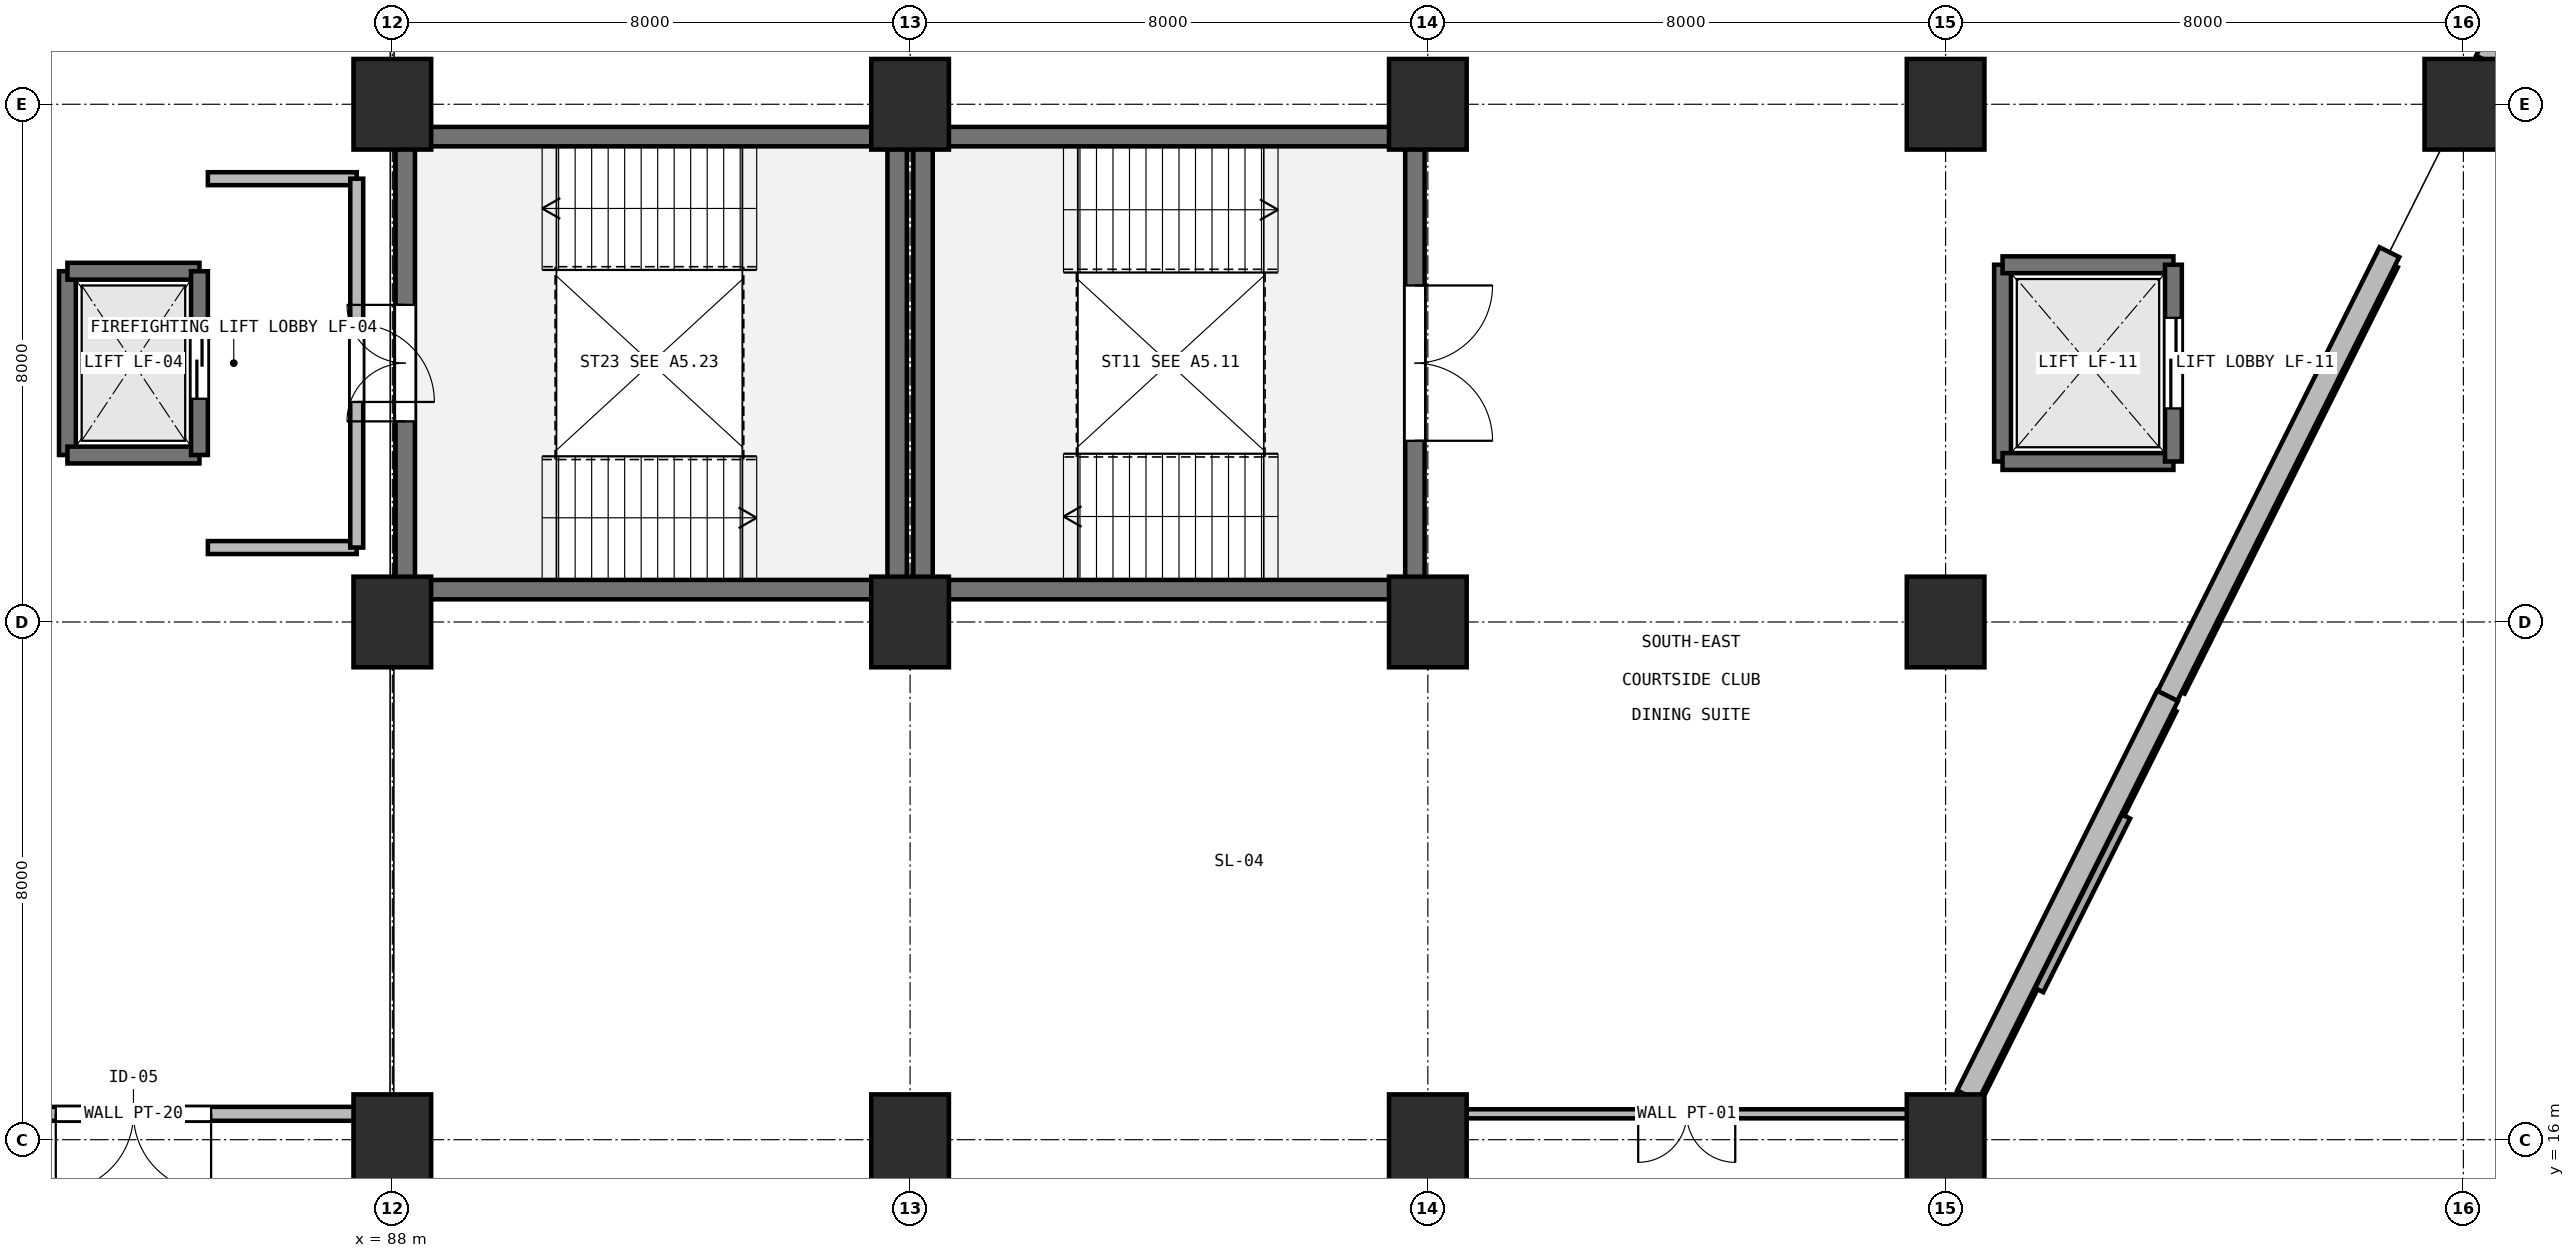
"""IFC4 building model, lengths in metres.
Left out: names, types, materials, properties, quantities, classifications, styles, units other than length and angle.
Written with IfcOpenShell. Run it as: python <this file> out.ifc"""

import sys

from ifc_helpers import new_model, si_unit, direction, frame, frame_2d, origin, origin_2d, place, context, subcontext, project, spatial, rectangle, extrude, element, fill, save


model = new_model("IFC4")
c1 = context("Model", 3, precision=1e-05, world=origin(), true_north=direction((0.0, 1.0)))
c2 = subcontext(c1, "Body", "Model", "MODEL_VIEW")
j1 = project(units=[si_unit("LENGTHUNIT", "METRE"), si_unit("PLANEANGLEUNIT", "RADIAN")], contexts=[c1])
p1 = place(None, origin())
s1 = spatial("IfcSite", under=j1, at=p1, CompositionType="ELEMENT")
p2 = place(p1, origin())
s2 = spatial("IfcBuilding", under=s1, at=p2, CompositionType="ELEMENT")
p3 = place(p2, frame((0.0, 0.0, 5.4)))
s3 = spatial("IfcBuildingStorey", under=s2, at=p3, CompositionType="ELEMENT", Elevation=5.4)
for number, where, z_axis, x_axis in (
    (1, (88.0, 16.0, 0.0), (0.0, 0.0, 1.0), (1.0, 0.0, 0.0)),
    (2, (88.0, 24.0, 0.0), (0.0, 0.0, 1.0), (1.0, 0.0, 0.0)),
    (3, (88.0, 32.0, 0.0), (0.0, 0.0, 1.0), (1.0, 0.0, 0.0)),
    (4, (96.0, 16.0, 0.0), (0.0, 0.0, 1.0), (1.0, 0.0, 0.0)),
    (5, (96.0, 24.0, 0.0), (0.0, 0.0, 1.0), (1.0, 0.0, 0.0)),
    (6, (96.0, 32.0, 0.0), (0.0, 0.0, 1.0), (1.0, 0.0, 0.0)),
    (7, (104.0, 16.0, 0.0), (0.0, 0.0, 1.0), (1.0, 0.0, 0.0)),
    (8, (104.0, 24.0, 0.0), (0.0, 0.0, 1.0), (1.0, 0.0, 0.0)),
    (9, (104.0, 32.0, 0.0), (0.0, 0.0, 1.0), (1.0, 0.0, 0.0)),
    (10, (112.0, 16.0, 0.0), (0.0, 0.0, 1.0), (1.0, 0.0, 0.0)),
    (11, (112.0, 24.0, 0.0), (0.0, 0.0, 1.0), (1.0, 0.0, 0.0)),
    (12, (112.0, 32.0, 0.0), (0.0, 0.0, 1.0), (1.0, 0.0, 0.0)),
    (13, (120.0, 32.0, 0.0), (0.0, 0.0, 1.0), (1.0, 0.0, 0.0)),
):
    element("IfcColumn", number, at=place(p3, frame(where, z_axis=z_axis, x_axis=x_axis)), inside=s3, PredefinedType="COLUMN", context=c2, shape_type="SweptSolid", body=[
        extrude(rectangle(XDim=1.2, YDim=1.4, at=origin_2d()), origin(), (0.0, 0.0, 1.0), 4.8),
    ])
p4 = place(p3, frame((122.286, 36.571, 0.0), z_axis=(0.0, 0.0, 1.0), x_axis=(-0.447191148821, -0.894438413987, 0.0)))
e14 = element("IfcWall", 14, at=p4, inside=s3, PredefinedType="SOLIDWALL", context=c2, shape_type="SweptSolid", body=[
    extrude(rectangle(XDim=4.351, YDim=0.32, at=frame_2d((2.175, 0.0))), origin(), (0.0, 0.0, 1.0), 3.45),
])
p5 = place(p3, frame((118.857, 29.714, 0.0), z_axis=(0.0, 0.0, 1.0), x_axis=(-0.447200857411, -0.894433559931, 0.0)))
e15 = element("IfcWall", 15, at=p5, inside=s3, PredefinedType="SOLIDWALL", context=c2, shape_type="SweptSolid", body=[
    extrude(rectangle(XDim=7.667, YDim=0.34, at=frame_2d((3.833, 0.0))), origin(), (0.0, 0.0, 1.0), 3.45),
])
p6 = place(p3, frame((115.429, 22.857, 0.0), z_axis=(0.0, 0.0, 1.0), x_axis=(-0.4472135955, -0.894427191, 0.0)))
e16 = element("IfcWall", 16, at=p6, inside=s3, PredefinedType="SOLIDWALL", context=c2, shape_type="SweptSolid", body=[
    extrude(rectangle(XDim=6.906, YDim=0.36, at=frame_2d((3.453, 0.0))), origin(), (0.0, 0.0, 1.0), 3.45),
])
p7 = place(p3, frame((103.8, 24.5, 0.0), z_axis=(0.0, 0.0, 1.0), x_axis=(-1.0, 0.0, 0.0)))
e17 = element("IfcWall", 17, at=p7, inside=s3, PredefinedType="SHEAR", context=c2, shape_type="SweptSolid", body=[
    extrude(rectangle(XDim=7.6, YDim=0.3, at=frame_2d((3.8, 0.0))), origin(), (0.0, 0.0, 1.0), 4.48),
])
p8 = place(p3, frame((96.2, 24.5, 0.0), z_axis=(0.0, 0.0, 1.0), x_axis=(0.0, 1.0, 0.0)))
e18 = element("IfcWall", 18, at=p8, inside=s3, PredefinedType="SHEAR", context=c2, shape_type="SweptSolid", body=[
    extrude(rectangle(XDim=7.0, YDim=0.3, at=frame_2d((3.5, 0.0))), origin(), (0.0, 0.0, 1.0), 4.48),
])
p9 = place(p3, frame((96.2, 31.5, 0.0), z_axis=(0.0, 0.0, 1.0), x_axis=(1.0, 0.0, 0.0)))
e19 = element("IfcWall", 19, at=p9, inside=s3, PredefinedType="SHEAR", context=c2, shape_type="SweptSolid", body=[
    extrude(rectangle(XDim=7.6, YDim=0.3, at=frame_2d((3.8, 0.0))), origin(), (0.0, 0.0, 1.0), 4.48),
])
p10 = place(p3, frame((103.8, 31.5, 0.0), z_axis=(0.0, 0.0, 1.0), x_axis=(0.0, -1.0, 0.0)))
e20 = element("IfcWall", 20, at=p10, inside=s3, PredefinedType="SHEAR", context=c2, shape_type="SweptSolid", body=[
    extrude(rectangle(XDim=7.0, YDim=0.3, at=frame_2d((3.5, 0.0))), origin(), (0.0, 0.0, 1.0), 4.48),
])
p11 = place(p10, frame((2.3, 0.0, 0.0)))
e21 = element("IfcOpeningElement", 21, at=p11, cuts=e20, PredefinedType="OPENING", context=c2, shape_type="SweptSolid", body=[
    extrude(rectangle(XDim=2.4, YDim=2.2, at=frame_2d((1.2, 1.1))), frame((0.0, 0.16, 0.0), z_axis=(0.0, -1.0, 0.0), x_axis=(1.0, 0.0, 0.0)), (0.0, 0.0, 1.0), 0.32),
])
p12 = place(p3, frame((95.8, 24.5, 0.0), z_axis=(0.0, 0.0, 1.0), x_axis=(-1.0, 0.0, 0.0)))
e22 = element("IfcWall", 22, at=p12, inside=s3, PredefinedType="SHEAR", context=c2, shape_type="SweptSolid", body=[
    extrude(rectangle(XDim=7.6, YDim=0.3, at=frame_2d((3.8, 0.0))), origin(), (0.0, 0.0, 1.0), 4.48),
])
p13 = place(p3, frame((88.2, 24.5, 0.0), z_axis=(0.0, 0.0, 1.0), x_axis=(0.0, 1.0, 0.0)))
e23 = element("IfcWall", 23, at=p13, inside=s3, PredefinedType="SHEAR", context=c2, shape_type="SweptSolid", body=[
    extrude(rectangle(XDim=7.0, YDim=0.3, at=frame_2d((3.5, 0.0))), origin(), (0.0, 0.0, 1.0), 4.48),
])
p14 = place(p13, frame((2.6, 0.0, 0.0)))
e24 = element("IfcOpeningElement", 24, at=p14, cuts=e23, PredefinedType="OPENING", context=c2, shape_type="SweptSolid", body=[
    extrude(rectangle(XDim=1.8, YDim=2.2, at=frame_2d((0.9, 1.1))), frame((0.0, 0.16, 0.0), z_axis=(0.0, -1.0, 0.0), x_axis=(1.0, 0.0, 0.0)), (0.0, 0.0, 1.0), 0.32),
])
p15 = place(p3, frame((88.2, 31.5, 0.0), z_axis=(0.0, 0.0, 1.0), x_axis=(1.0, 0.0, 0.0)))
e25 = element("IfcWall", 25, at=p15, inside=s3, PredefinedType="SHEAR", context=c2, shape_type="SweptSolid", body=[
    extrude(rectangle(XDim=7.6, YDim=0.3, at=frame_2d((3.8, 0.0))), origin(), (0.0, 0.0, 1.0), 4.48),
])
p16 = place(p3, frame((95.8, 31.5, 0.0), z_axis=(0.0, 0.0, 1.0), x_axis=(0.0, -1.0, 0.0)))
e26 = element("IfcWall", 26, at=p16, inside=s3, PredefinedType="SHEAR", context=c2, shape_type="SweptSolid", body=[
    extrude(rectangle(XDim=7.0, YDim=0.3, at=frame_2d((3.5, 0.0))), origin(), (0.0, 0.0, 1.0), 4.48),
])
p17 = place(p3, frame((82.98, 26.58, 0.0), z_axis=(0.0, 0.0, 1.0), x_axis=(0.0, 1.0, 0.0)))
e27 = element("IfcWall", 27, at=p17, inside=s3, PredefinedType="SHEAR", context=c2, shape_type="SweptSolid", body=[
    extrude(rectangle(XDim=2.84, YDim=0.26, at=frame_2d((1.42, 0.0))), origin(), (0.0, 0.0, 1.0), 4.48),
])
for number, where, z_axis, x_axis in (
    (28, (82.98, 29.42, 0.0), (0.0, 0.0, 1.0), (1.0, 0.0, 0.0)),
    (29, (85.02, 26.58, 0.0), (0.0, 0.0, 1.0), (-1.0, 0.0, 0.0)),
):
    element("IfcWall", number, at=place(p3, frame(where, z_axis=z_axis, x_axis=x_axis)), inside=s3, PredefinedType="SHEAR", context=c2, shape_type="SweptSolid", body=[
        extrude(rectangle(XDim=2.04, YDim=0.26, at=frame_2d((1.02, 0.0))), origin(), (0.0, 0.0, 1.0), 4.48),
    ])
p18 = place(p3, frame((85.02, 29.42, 0.0), z_axis=(0.0, 0.0, 1.0), x_axis=(0.0, -1.0, 0.0)))
e30 = element("IfcWall", 30, at=p18, inside=s3, PredefinedType="SHEAR", context=c2, shape_type="SweptSolid", body=[
    extrude(rectangle(XDim=2.84, YDim=0.26, at=frame_2d((1.42, 0.0))), origin(), (0.0, 0.0, 1.0), 4.48),
])
p19 = place(p18, frame((0.87, 0.0, 0.0)))
e31 = element("IfcOpeningElement", 31, at=p19, cuts=e30, PredefinedType="OPENING", context=c2, shape_type="SweptSolid", body=[
    extrude(rectangle(XDim=1.1, YDim=2.15, at=frame_2d((0.55, 1.075))), frame((0.0, 0.14, 0.0), z_axis=(0.0, -1.0, 0.0), x_axis=(1.0, 0.0, 0.0)), (0.0, 0.0, 1.0), 0.28),
])
for number, where, z_axis, x_axis in (
    (32, (85.15, 30.85, 0.0), (0.0, 0.0, 1.0), (1.0, 0.0, 0.0)),
    (33, (87.45, 25.15, 0.0), (0.0, 0.0, 1.0), (-1.0, 0.0, 0.0)),
):
    element("IfcWall", number, at=place(p3, frame(where, z_axis=z_axis, x_axis=x_axis)), inside=s3, PredefinedType="PARTITIONING", context=c2, shape_type="SweptSolid", body=[
        extrude(rectangle(XDim=2.3, YDim=0.2, at=frame_2d((1.15, 0.0))), origin(), (0.0, 0.0, 1.0), 4.48),
    ])
p20 = place(p3, frame((87.45, 30.85, 0.0), z_axis=(0.0, 0.0, 1.0), x_axis=(0.0, -1.0, 0.0)))
e34 = element("IfcWall", 34, at=p20, inside=s3, PredefinedType="PARTITIONING", context=c2, shape_type="SweptSolid", body=[
    extrude(rectangle(XDim=5.7, YDim=0.2, at=frame_2d((2.85, 0.0))), origin(), (0.0, 0.0, 1.0), 3.45),
])
p21 = place(p20, frame((2.25, 0.0, 0.0)))
e35 = element("IfcOpeningElement", 35, at=p21, cuts=e34, PredefinedType="OPENING", context=c2, shape_type="SweptSolid", body=[
    extrude(rectangle(XDim=1.2, YDim=2.2, at=frame_2d((0.6, 1.1))), frame((0.0, 0.11, 0.0), z_axis=(0.0, -1.0, 0.0), x_axis=(1.0, 0.0, 0.0)), (0.0, 0.0, 1.0), 0.22),
])
p22 = place(p3, frame((112.88, 26.48, 0.0), z_axis=(0.0, 0.0, 1.0), x_axis=(0.0, 1.0, 0.0)))
e36 = element("IfcWall", 36, at=p22, inside=s3, PredefinedType="SHEAR", context=c2, shape_type="SweptSolid", body=[
    extrude(rectangle(XDim=3.04, YDim=0.26, at=frame_2d((1.52, 0.0))), origin(), (0.0, 0.0, 1.0), 4.48),
])
for number, where, z_axis, x_axis in (
    (37, (112.88, 29.52, 0.0), (0.0, 0.0, 1.0), (1.0, 0.0, 0.0)),
    (38, (115.52, 26.48, 0.0), (0.0, 0.0, 1.0), (-1.0, 0.0, 0.0)),
):
    element("IfcWall", number, at=place(p3, frame(where, z_axis=z_axis, x_axis=x_axis)), inside=s3, PredefinedType="SHEAR", context=c2, shape_type="SweptSolid", body=[
        extrude(rectangle(XDim=2.64, YDim=0.26, at=frame_2d((1.32, 0.0))), origin(), (0.0, 0.0, 1.0), 4.48),
    ])
p23 = place(p3, frame((115.52, 29.52, 0.0), z_axis=(0.0, 0.0, 1.0), x_axis=(0.0, -1.0, 0.0)))
e39 = element("IfcWall", 39, at=p23, inside=s3, PredefinedType="SHEAR", context=c2, shape_type="SweptSolid", body=[
    extrude(rectangle(XDim=3.04, YDim=0.26, at=frame_2d((1.52, 0.0))), origin(), (0.0, 0.0, 1.0), 4.48),
])
p24 = place(p23, frame((0.82, 0.0, 0.0)))
e40 = element("IfcOpeningElement", 40, at=p24, cuts=e39, PredefinedType="OPENING", context=c2, shape_type="SweptSolid", body=[
    extrude(rectangle(XDim=1.4, YDim=2.2, at=frame_2d((0.7, 1.1))), frame((0.0, 0.14, 0.0), z_axis=(0.0, -1.0, 0.0), x_axis=(1.0, 0.0, 0.0)), (0.0, 0.0, 1.0), 0.28),
])
p25 = place(p3, frame((87.527, 16.4, 0.0), z_axis=(0.0, 0.0, 1.0), x_axis=(-1.0, 0.0, 0.0)))
e41 = element("IfcWall", 41, at=p25, inside=s3, PredefinedType="PARTITIONING", context=c2, shape_type="SweptSolid", body=[
    extrude(rectangle(XDim=7.054, YDim=0.215, at=frame_2d((3.527, 0.0))), origin(), (0.0, 0.0, 1.0), 3.45),
])
p26 = place(p25, frame((2.327, 0.0, 0.0)))
e42 = element("IfcOpeningElement", 42, at=p26, cuts=e41, PredefinedType="OPENING", context=c2, shape_type="SweptSolid", body=[
    extrude(rectangle(XDim=2.4, YDim=2.2, at=frame_2d((1.2, 1.1))), frame((0.0, 0.118, 0.0), z_axis=(0.0, -1.0, 0.0), x_axis=(1.0, 0.0, 0.0)), (0.0, 0.0, 1.0), 0.235),
])
p27 = place(p3, frame((111.527, 16.4, 0.0), z_axis=(0.0, 0.0, 1.0), x_axis=(-1.0, 0.0, 0.0)))
e43 = element("IfcWall", 43, at=p27, inside=s3, PredefinedType="PARTITIONING", context=c2, shape_type="SweptSolid", body=[
    extrude(rectangle(XDim=7.054, YDim=0.14, at=frame_2d((3.527, 0.0))), origin(), (0.0, 0.0, 1.0), 3.45),
])
p28 = place(p27, frame((2.777, 0.0, 0.0)))
e44 = element("IfcOpeningElement", 44, at=p28, cuts=e43, PredefinedType="OPENING", context=c2, shape_type="SweptSolid", body=[
    extrude(rectangle(XDim=1.5, YDim=2.2, at=frame_2d((0.75, 1.1))), frame((0.0, 0.08, 0.0), z_axis=(0.0, -1.0, 0.0), x_axis=(1.0, 0.0, 0.0)), (0.0, 0.0, 1.0), 0.16),
])
p29 = place(p11, frame((2.4, 0.0, 0.0), z_axis=(0.0, 0.0, 1.0), x_axis=(-1.0, 0.0, 0.0)))
e45 = element("IfcDoor", 45, at=p29, inside=s3, OperationType="DOUBLE_DOOR_SINGLE_SWING", PredefinedType="DOOR", context=c2, shape_type="SweptSolid", body=[
    extrude(rectangle(XDim=2.4, YDim=2.2, at=frame_2d((1.2, 1.1))), frame((0.0, 0.025, 0.0), z_axis=(0.0, -1.0, 0.0), x_axis=(1.0, 0.0, 0.0)), (0.0, 0.0, 1.0), 0.05),
])
fill(e21, e45)
p30 = place(p14, frame((1.8, 0.0, 0.0), z_axis=(0.0, 0.0, 1.0), x_axis=(-1.0, 0.0, 0.0)))
e46 = element("IfcDoor", 46, at=p30, inside=s3, OperationType="DOUBLE_DOOR_SINGLE_SWING", PredefinedType="DOOR", context=c2, shape_type="SweptSolid", body=[
    extrude(rectangle(XDim=1.8, YDim=2.2, at=frame_2d((0.9, 1.1))), frame((0.0, 0.025, 0.0), z_axis=(0.0, -1.0, 0.0), x_axis=(1.0, 0.0, 0.0)), (0.0, 0.0, 1.0), 0.05),
])
fill(e24, e46)
p31 = place(p19, origin())
e47 = element("IfcDoor", 47, at=p31, inside=s3, OperationType="SLIDING_TO_LEFT", PredefinedType="DOOR", context=c2, shape_type="SweptSolid", body=[
    extrude(rectangle(XDim=1.1, YDim=2.15, at=frame_2d((0.55, 1.075))), frame((0.0, 0.025, 0.0), z_axis=(0.0, -1.0, 0.0), x_axis=(1.0, 0.0, 0.0)), (0.0, 0.0, 1.0), 0.05),
])
fill(e31, e47)
p32 = place(p21, origin())
e48 = element("IfcDoor", 48, at=p32, inside=s3, OperationType="SINGLE_SWING_RIGHT", PredefinedType="DOOR", context=c2, shape_type="SweptSolid", body=[
    extrude(rectangle(XDim=1.2, YDim=2.2, at=frame_2d((0.6, 1.1))), frame((0.0, 0.025, 0.0), z_axis=(0.0, -1.0, 0.0), x_axis=(1.0, 0.0, 0.0)), (0.0, 0.0, 1.0), 0.05),
])
fill(e35, e48)
p33 = place(p24, origin())
e49 = element("IfcDoor", 49, at=p33, inside=s3, OperationType="SLIDING_TO_LEFT", PredefinedType="DOOR", context=c2, shape_type="SweptSolid", body=[
    extrude(rectangle(XDim=1.4, YDim=2.2, at=frame_2d((0.7, 1.1))), frame((0.0, 0.025, 0.0), z_axis=(0.0, -1.0, 0.0), x_axis=(1.0, 0.0, 0.0)), (0.0, 0.0, 1.0), 0.05),
])
fill(e40, e49)
p34 = place(p26, origin())
e50 = element("IfcDoor", 50, at=p34, inside=s3, OperationType="DOUBLE_DOOR_SINGLE_SWING", PredefinedType="DOOR", context=c2, shape_type="SweptSolid", body=[
    extrude(rectangle(XDim=2.4, YDim=2.2, at=frame_2d((1.2, 1.1))), frame((0.0, 0.025, 0.0), z_axis=(0.0, -1.0, 0.0), x_axis=(1.0, 0.0, 0.0)), (0.0, 0.0, 1.0), 0.05),
])
fill(e42, e50)
p35 = place(p28, origin())
e51 = element("IfcDoor", 51, at=p35, inside=s3, OperationType="DOUBLE_DOOR_SINGLE_SWING", PredefinedType="DOOR", context=c2, shape_type="SweptSolid", body=[
    extrude(rectangle(XDim=1.5, YDim=2.2, at=frame_2d((0.75, 1.1))), frame((0.0, 0.025, 0.0), z_axis=(0.0, -1.0, 0.0), x_axis=(1.0, 0.0, 0.0)), (0.0, 0.0, 1.0), 0.05),
])
fill(e44, e51)
save(model, sys.argv[1])
